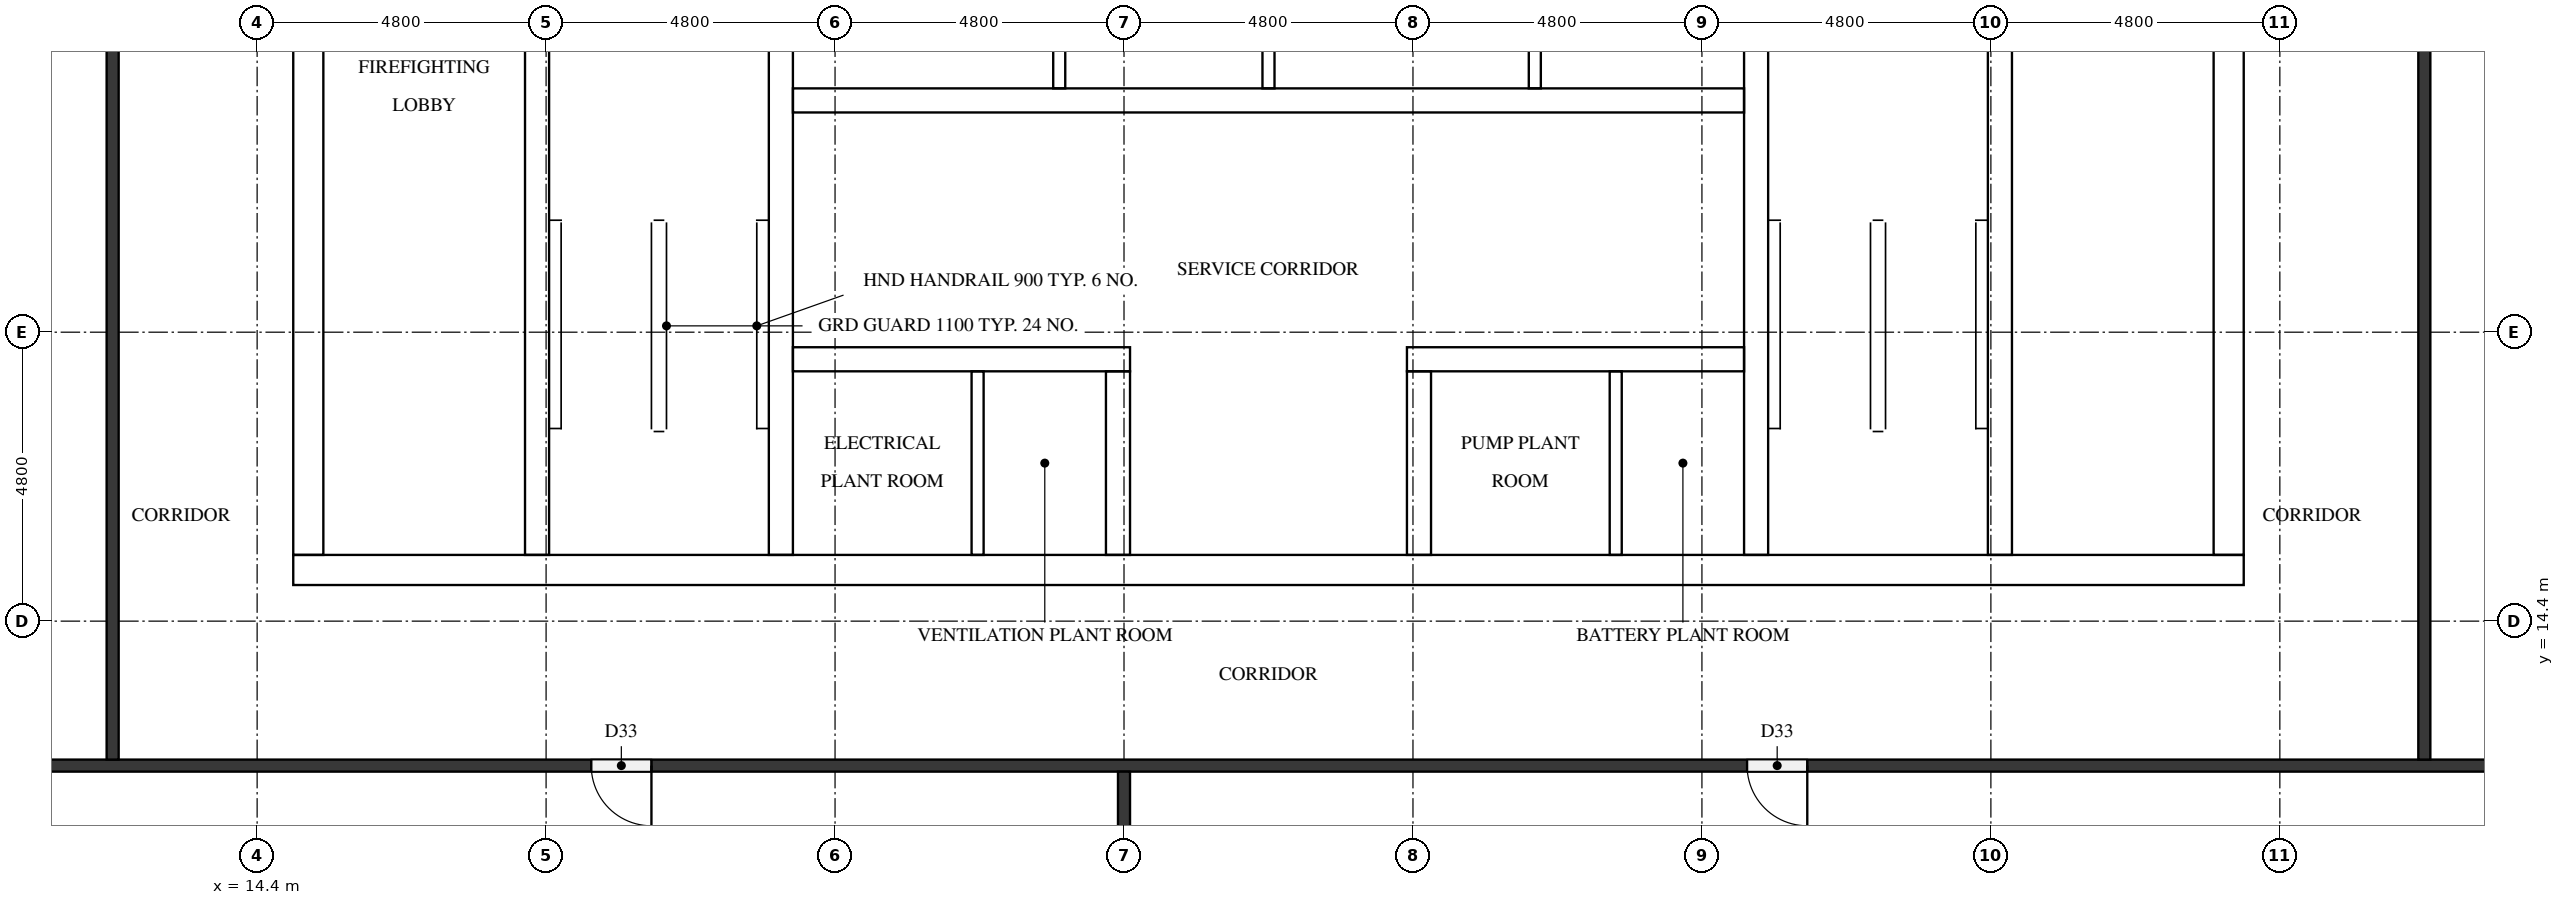
"""IFC4 building model, lengths in metres.
Left out: names, types, materials, properties, quantities, classifications, styles, units other than length and angle.
Written with IfcOpenShell. Run it as: python <this file> out.ifc"""

import sys

from ifc_helpers import new_model, si_unit, direction, frame, frame_2d, origin, place, context, subcontext, project, spatial, rectangle, extrude, element, fill, save


model = new_model("IFC4")
c1 = context("Model", 3, precision=1e-05, world=origin(), true_north=direction((0.0, 1.0)))
c2 = subcontext(c1, "Body", "Model", "MODEL_VIEW")
j1 = project(units=[si_unit("LENGTHUNIT", "METRE"), si_unit("PLANEANGLEUNIT", "RADIAN")], contexts=[c1])
p1 = place(None, origin())
s1 = spatial("IfcSite", under=j1, at=p1, CompositionType="ELEMENT")
p2 = place(p1, origin())
s2 = spatial("IfcBuilding", under=s1, at=p2, CompositionType="ELEMENT")
p3 = place(p2, frame((0.0, 0.0, 310.1)))
s3 = spatial("IfcBuildingStorey", under=s2, at=p3, CompositionType="ELEMENT", Elevation=310.1)
p4 = place(p3, frame((15.0, 15.25, 0.0), z_axis=(0.0, 0.0, 1.0), x_axis=(1.0, 0.0, 0.0)))
e1 = element("IfcWall", 1, at=p4, inside=s3, PredefinedType="SHEAR", context=c2, shape_type="SweptSolid", body=[
    extrude(rectangle(XDim=32.4, YDim=0.5, at=frame_2d((16.2, 0.0))), origin(), (0.0, 0.0, 1.0), 3.8),
])
p5 = place(p4, frame((15.3, 0.0, 0.0)))
e2 = element("IfcOpeningElement", 2, at=p5, cuts=e1, PredefinedType="OPENING", context=c2, shape_type="SweptSolid", body=[
    extrude(rectangle(XDim=1.8, YDim=2.1, at=frame_2d((0.9, 1.05))), frame((0.0, 0.26, 0.0), z_axis=(0.0, -1.0, 0.0), x_axis=(1.0, 0.0, 0.0)), (0.0, 0.0, 1.0), 0.52),
])
p6 = place(p3, frame((15.25, 15.5, 0.0), z_axis=(0.0, 0.0, 1.0), x_axis=(0.0, 1.0, 0.0)))
e3 = element("IfcWall", 3, at=p6, inside=s3, PredefinedType="SHEAR", context=c2, shape_type="SweptSolid", body=[
    extrude(rectangle(XDim=21.8, YDim=0.5, at=frame_2d((10.9, 0.0))), origin(), (0.0, 0.0, 1.0), 3.8),
])
p7 = place(p6, frame((5.26, 0.0, 0.0)))
e4 = element("IfcOpeningElement", 4, at=p7, cuts=e3, PredefinedType="OPENING", context=c2, shape_type="SweptSolid", body=[
    extrude(rectangle(XDim=1.2, YDim=2.1, at=frame_2d((0.6, 1.05))), frame((0.0, 0.26, 0.0), z_axis=(0.0, -1.0, 0.0), x_axis=(1.0, 0.0, 0.0)), (0.0, 0.0, 1.0), 0.52),
])
p8 = place(p3, frame((47.15, 15.5, 0.0), z_axis=(0.0, 0.0, 1.0), x_axis=(0.0, 1.0, 0.0)))
e5 = element("IfcWall", 5, at=p8, inside=s3, PredefinedType="SHEAR", context=c2, shape_type="SweptSolid", body=[
    extrude(rectangle(XDim=21.8, YDim=0.5, at=frame_2d((10.9, 0.0))), origin(), (0.0, 0.0, 1.0), 3.8),
])
p9 = place(p8, frame((10.6, 0.0, 0.0)))
e6 = element("IfcOpeningElement", 6, at=p9, cuts=e5, PredefinedType="OPENING", context=c2, shape_type="SweptSolid", body=[
    extrude(rectangle(XDim=1.2, YDim=2.1, at=frame_2d((0.6, 1.05))), frame((0.0, 0.26, 0.0), z_axis=(0.0, -1.0, 0.0), x_axis=(1.0, 0.0, 0.0)), (0.0, 0.0, 1.0), 0.52),
])
p10 = place(p3, frame((19.05, 15.5, 0.0), z_axis=(0.0, 0.0, 1.0), x_axis=(0.0, 1.0, 0.0)))
e7 = element("IfcWall", 7, at=p10, inside=s3, PredefinedType="SHEAR", context=c2, shape_type="SweptSolid", body=[
    extrude(rectangle(XDim=15.55, YDim=0.4, at=frame_2d((7.775, 0.0))), origin(), (0.0, 0.0, 1.0), 3.8),
])
p11 = place(p10, frame((9.95, 0.0, 0.0)))
e8 = element("IfcOpeningElement", 8, at=p11, cuts=e7, PredefinedType="OPENING", context=c2, shape_type="SweptSolid", body=[
    extrude(rectangle(XDim=1.1, YDim=2.1, at=frame_2d((0.55, 1.05))), frame((0.0, 0.21, 0.0), z_axis=(0.0, -1.0, 0.0), x_axis=(1.0, 0.0, 0.0)), (0.0, 0.0, 1.0), 0.42),
])
p12 = place(p10, frame((13.45, 0.0, 0.0)))
e9 = element("IfcOpeningElement", 9, at=p12, cuts=e7, PredefinedType="OPENING", context=c2, shape_type="SweptSolid", body=[
    extrude(rectangle(XDim=1.1, YDim=2.1, at=frame_2d((0.55, 1.05))), frame((0.0, 0.21, 0.0), z_axis=(0.0, -1.0, 0.0), x_axis=(1.0, 0.0, 0.0)), (0.0, 0.0, 1.0), 0.42),
])
p13 = place(p10, frame((0.7, 0.0, 0.0)))
e10 = element("IfcOpeningElement", 10, at=p13, cuts=e7, PredefinedType="OPENING", context=c2, shape_type="SweptSolid", body=[
    extrude(rectangle(XDim=1.2, YDim=2.1, at=frame_2d((0.6, 1.05))), frame((0.0, 0.21, 0.0), z_axis=(0.0, -1.0, 0.0), x_axis=(1.0, 0.0, 0.0)), (0.0, 0.0, 1.0), 0.42),
])
p14 = place(p3, frame((23.1, 15.5, 0.0), z_axis=(0.0, 0.0, 1.0), x_axis=(0.0, 1.0, 0.0)))
e11 = element("IfcWall", 11, at=p14, inside=s3, PredefinedType="SHEAR", context=c2, shape_type="SweptSolid", body=[
    extrude(rectangle(XDim=21.8, YDim=0.4, at=frame_2d((10.9, 0.0))), origin(), (0.0, 0.0, 1.0), 3.8),
])
p15 = place(p3, frame((39.3, 15.5, 0.0), z_axis=(0.0, 0.0, 1.0), x_axis=(0.0, 1.0, 0.0)))
e12 = element("IfcWall", 12, at=p15, inside=s3, PredefinedType="SHEAR", context=c2, shape_type="SweptSolid", body=[
    extrude(rectangle(XDim=8.75, YDim=0.4, at=frame_2d((4.375, 0.0))), origin(), (0.0, 0.0, 1.0), 3.8),
])
p16 = place(p3, frame((43.35, 15.5, 0.0), z_axis=(0.0, 0.0, 1.0), x_axis=(0.0, 1.0, 0.0)))
e13 = element("IfcWall", 13, at=p16, inside=s3, PredefinedType="SHEAR", context=c2, shape_type="SweptSolid", body=[
    extrude(rectangle(XDim=8.75, YDim=0.4, at=frame_2d((4.375, 0.0))), origin(), (0.0, 0.0, 1.0), 3.8),
])
p17 = place(p16, frame((0.7, 0.0, 0.0)))
e14 = element("IfcOpeningElement", 14, at=p17, cuts=e13, PredefinedType="OPENING", context=c2, shape_type="SweptSolid", body=[
    extrude(rectangle(XDim=1.2, YDim=2.1, at=frame_2d((0.6, 1.05))), frame((0.0, 0.21, 0.0), z_axis=(0.0, -1.0, 0.0), x_axis=(1.0, 0.0, 0.0)), (0.0, 0.0, 1.0), 0.42),
])
p18 = place(p3, frame((23.3, 18.75, 0.0), z_axis=(0.0, 0.0, 1.0), x_axis=(1.0, 0.0, 0.0)))
e15 = element("IfcWall", 15, at=p18, inside=s3, PredefinedType="SHEAR", context=c2, shape_type="SweptSolid", body=[
    extrude(rectangle(XDim=5.6, YDim=0.4, at=frame_2d((2.8, 0.0))), origin(), (0.0, 0.0, 1.0), 3.8),
])
p19 = place(p18, frame((0.984, 0.0, 0.0)))
e16 = element("IfcOpeningElement", 16, at=p19, cuts=e15, PredefinedType="OPENING", context=c2, shape_type="SweptSolid", body=[
    extrude(rectangle(XDim=1.0, YDim=2.1, at=frame_2d((0.5, 1.05))), frame((0.0, 0.21, 0.0), z_axis=(0.0, -1.0, 0.0), x_axis=(1.0, 0.0, 0.0)), (0.0, 0.0, 1.0), 0.42),
])
p20 = place(p18, frame((3.684, 0.0, 0.0)))
e17 = element("IfcOpeningElement", 17, at=p20, cuts=e15, PredefinedType="OPENING", context=c2, shape_type="SweptSolid", body=[
    extrude(rectangle(XDim=1.0, YDim=2.1, at=frame_2d((0.5, 1.05))), frame((0.0, 0.21, 0.0), z_axis=(0.0, -1.0, 0.0), x_axis=(1.0, 0.0, 0.0)), (0.0, 0.0, 1.0), 0.42),
])
p21 = place(p3, frame((33.5, 18.75, 0.0), z_axis=(0.0, 0.0, 1.0), x_axis=(1.0, 0.0, 0.0)))
e18 = element("IfcWall", 18, at=p21, inside=s3, PredefinedType="SHEAR", context=c2, shape_type="SweptSolid", body=[
    extrude(rectangle(XDim=5.6, YDim=0.4, at=frame_2d((2.8, 0.0))), origin(), (0.0, 0.0, 1.0), 3.8),
])
p22 = place(p21, frame((1.384, 0.0, 0.0)))
e19 = element("IfcOpeningElement", 19, at=p22, cuts=e18, PredefinedType="OPENING", context=c2, shape_type="SweptSolid", body=[
    extrude(rectangle(XDim=1.0, YDim=2.1, at=frame_2d((0.5, 1.05))), frame((0.0, 0.21, 0.0), z_axis=(0.0, -1.0, 0.0), x_axis=(1.0, 0.0, 0.0)), (0.0, 0.0, 1.0), 0.42),
])
p23 = place(p21, frame((4.084, 0.0, 0.0)))
e20 = element("IfcOpeningElement", 20, at=p23, cuts=e18, PredefinedType="OPENING", context=c2, shape_type="SweptSolid", body=[
    extrude(rectangle(XDim=1.0, YDim=2.1, at=frame_2d((0.5, 1.05))), frame((0.0, 0.21, 0.0), z_axis=(0.0, -1.0, 0.0), x_axis=(1.0, 0.0, 0.0)), (0.0, 0.0, 1.0), 0.42),
])
p24 = place(p3, frame((23.3, 23.05, 0.0), z_axis=(0.0, 0.0, 1.0), x_axis=(1.0, 0.0, 0.0)))
e21 = element("IfcWall", 21, at=p24, inside=s3, PredefinedType="SHEAR", context=c2, shape_type="SweptSolid", body=[
    extrude(rectangle(XDim=15.8, YDim=0.4, at=frame_2d((7.9, 0.0))), origin(), (0.0, 0.0, 1.0), 3.8),
])
p25 = place(p24, frame((1.662, 0.0, 0.0)))
e22 = element("IfcOpeningElement", 22, at=p25, cuts=e21, PredefinedType="OPENING", context=c2, shape_type="SweptSolid", body=[
    extrude(rectangle(XDim=1.0, YDim=2.1, at=frame_2d((0.5, 1.05))), frame((0.0, 0.21, 0.0), z_axis=(0.0, -1.0, 0.0), x_axis=(1.0, 0.0, 0.0)), (0.0, 0.0, 1.0), 0.42),
])
p26 = place(p24, frame((5.662, 0.0, 0.0)))
e23 = element("IfcOpeningElement", 23, at=p26, cuts=e21, PredefinedType="OPENING", context=c2, shape_type="SweptSolid", body=[
    extrude(rectangle(XDim=1.0, YDim=2.1, at=frame_2d((0.5, 1.05))), frame((0.0, 0.21, 0.0), z_axis=(0.0, -1.0, 0.0), x_axis=(1.0, 0.0, 0.0)), (0.0, 0.0, 1.0), 0.42),
])
p27 = place(p24, frame((9.612, 0.0, 0.0)))
e24 = element("IfcOpeningElement", 24, at=p27, cuts=e21, PredefinedType="OPENING", context=c2, shape_type="SweptSolid", body=[
    extrude(rectangle(XDim=1.0, YDim=2.1, at=frame_2d((0.5, 1.05))), frame((0.0, 0.21, 0.0), z_axis=(0.0, -1.0, 0.0), x_axis=(1.0, 0.0, 0.0)), (0.0, 0.0, 1.0), 0.42),
])
p28 = place(p24, frame((13.612, 0.0, 0.0)))
e25 = element("IfcOpeningElement", 25, at=p28, cuts=e21, PredefinedType="OPENING", context=c2, shape_type="SweptSolid", body=[
    extrude(rectangle(XDim=1.0, YDim=2.1, at=frame_2d((0.5, 1.05))), frame((0.0, 0.21, 0.0), z_axis=(0.0, -1.0, 0.0), x_axis=(1.0, 0.0, 0.0)), (0.0, 0.0, 1.0), 0.42),
])
for number, where, z_axis, x_axis in (
    (26, (28.7, 15.5, 0.0), (0.0, 0.0, 1.0), (0.0, 1.0, 0.0)),
    (27, (33.7, 15.5, 0.0), (0.0, 0.0, 1.0), (0.0, 1.0, 0.0)),
):
    element("IfcWall", number, at=place(p3, frame(where, z_axis=z_axis, x_axis=x_axis)), inside=s3, PredefinedType="SHEAR", context=c2, shape_type="SweptSolid", body=[
        extrude(rectangle(XDim=3.05, YDim=0.4, at=frame_2d((1.525, 0.0))), origin(), (0.0, 0.0, 1.0), 3.8),
    ])
for number, where, z_axis, x_axis in (
    (28, (27.724, 23.25, 0.0), (0.0, 0.0, 1.0), (0.0, 1.0, 0.0)),
    (29, (31.2, 23.25, 0.0), (0.0, 0.0, 1.0), (0.0, 1.0, 0.0)),
    (30, (35.624, 23.25, 0.0), (0.0, 0.0, 1.0), (0.0, 1.0, 0.0)),
):
    element("IfcWall", number, at=place(p3, frame(where, z_axis=z_axis, x_axis=x_axis)), inside=s3, PredefinedType="PARTITIONING", context=c2, shape_type="SweptSolid", body=[
        extrude(rectangle(XDim=2.7, YDim=0.2, at=frame_2d((1.35, 0.0))), origin(), (0.0, 0.0, 1.0), 3.8),
    ])
for number, where, z_axis, x_axis in (
    (31, (26.368, 15.5, 0.0), (0.0, 0.0, 1.0), (0.0, 1.0, 0.0)),
    (32, (36.968, 15.5, 0.0), (0.0, 0.0, 1.0), (0.0, 1.0, 0.0)),
):
    element("IfcWall", number, at=place(p3, frame(where, z_axis=z_axis, x_axis=x_axis)), inside=s3, PredefinedType="PARTITIONING", context=c2, shape_type="SweptSolid", body=[
        extrude(rectangle(XDim=3.05, YDim=0.2, at=frame_2d((1.525, 0.0))), origin(), (0.0, 0.0, 1.0), 3.8),
    ])
p29 = place(p3, frame((56.3, 12.0, 0.0), z_axis=(0.0, 0.0, 1.0), x_axis=(-1.0, 0.0, 0.0)))
e33 = element("IfcWall", 33, at=p29, inside=s3, PredefinedType="PARTITIONING", context=c2, shape_type="SweptSolid", body=[
    extrude(rectangle(XDim=55.0, YDim=0.2, at=frame_2d((27.5, 0.0))), origin(), (0.0, 0.0, 1.0), 3.8),
])
p30 = place(p29, frame((35.35, 0.0, 0.0)))
e34 = element("IfcOpeningElement", 34, at=p30, cuts=e33, PredefinedType="OPENING", context=c2, shape_type="SweptSolid", body=[
    extrude(rectangle(XDim=1.0, YDim=2.1, at=frame_2d((0.5, 1.05))), frame((0.0, 0.11, 0.0), z_axis=(0.0, -1.0, 0.0), x_axis=(1.0, 0.0, 0.0)), (0.0, 0.0, 1.0), 0.22),
])
p31 = place(p29, frame((16.15, 0.0, 0.0)))
e35 = element("IfcOpeningElement", 35, at=p31, cuts=e33, PredefinedType="OPENING", context=c2, shape_type="SweptSolid", body=[
    extrude(rectangle(XDim=1.0, YDim=2.1, at=frame_2d((0.5, 1.05))), frame((0.0, 0.11, 0.0), z_axis=(0.0, -1.0, 0.0), x_axis=(1.0, 0.0, 0.0)), (0.0, 0.0, 1.0), 0.22),
])
p32 = place(p3, frame((12.0, 12.1, 0.0), z_axis=(0.0, 0.0, 1.0), x_axis=(0.0, 1.0, 0.0)))
e36 = element("IfcWall", 36, at=p32, inside=s3, PredefinedType="PARTITIONING", context=c2, shape_type="SweptSolid", body=[
    extrude(rectangle(XDim=28.6, YDim=0.2, at=frame_2d((14.3, 0.0))), origin(), (0.0, 0.0, 1.0), 3.8),
])
p33 = place(p32, frame((13.75, 0.0, 0.0)))
e37 = element("IfcOpeningElement", 37, at=p33, cuts=e36, PredefinedType="OPENING", context=c2, shape_type="SweptSolid", body=[
    extrude(rectangle(XDim=1.0, YDim=2.1, at=frame_2d((0.5, 1.05))), frame((0.0, 0.11, 0.0), z_axis=(0.0, -1.0, 0.0), x_axis=(1.0, 0.0, 0.0)), (0.0, 0.0, 1.0), 0.22),
])
p34 = place(p3, frame((28.8, 1.3, 0.0), z_axis=(0.0, 0.0, 1.0), x_axis=(0.0, 1.0, 0.0)))
e38 = element("IfcWall", 38, at=p34, inside=s3, PredefinedType="PARTITIONING", context=c2, shape_type="SweptSolid", body=[
    extrude(rectangle(XDim=10.6, YDim=0.2, at=frame_2d((5.3, 0.0))), origin(), (0.0, 0.0, 1.0), 3.8),
])
p35 = place(p3, frame((50.4, 40.7, 0.0), z_axis=(0.0, 0.0, 1.0), x_axis=(0.0, -1.0, 0.0)))
e39 = element("IfcWall", 39, at=p35, inside=s3, PredefinedType="PARTITIONING", context=c2, shape_type="SweptSolid", body=[
    extrude(rectangle(XDim=28.6, YDim=0.2, at=frame_2d((14.3, 0.0))), origin(), (0.0, 0.0, 1.0), 3.8),
])
p36 = place(p35, frame((13.75, 0.0, 0.0)))
e40 = element("IfcOpeningElement", 40, at=p36, cuts=e39, PredefinedType="OPENING", context=c2, shape_type="SweptSolid", body=[
    extrude(rectangle(XDim=1.0, YDim=2.1, at=frame_2d((0.5, 1.05))), frame((0.0, 0.11, 0.0), z_axis=(0.0, -1.0, 0.0), x_axis=(1.0, 0.0, 0.0)), (0.0, 0.0, 1.0), 0.22),
])
p37 = place(p13, frame((1.2, 0.0, 0.0), z_axis=(0.0, 0.0, 1.0), x_axis=(-1.0, 0.0, 0.0)))
e41 = element("IfcDoor", 41, at=p37, inside=s3, OperationType="SINGLE_SWING_RIGHT", PredefinedType="DOOR", context=c2, shape_type="SweptSolid", body=[
    extrude(rectangle(XDim=1.2, YDim=2.1, at=frame_2d((0.6, 1.05))), frame((0.0, 0.025, 0.0), z_axis=(0.0, -1.0, 0.0), x_axis=(1.0, 0.0, 0.0)), (0.0, 0.0, 1.0), 0.05),
])
fill(e10, e41)
p38 = place(p17, origin())
e42 = element("IfcDoor", 42, at=p38, inside=s3, OperationType="SINGLE_SWING_LEFT", PredefinedType="DOOR", context=c2, shape_type="SweptSolid", body=[
    extrude(rectangle(XDim=1.2, YDim=2.1, at=frame_2d((0.6, 1.05))), frame((0.0, 0.025, 0.0), z_axis=(0.0, -1.0, 0.0), x_axis=(1.0, 0.0, 0.0)), (0.0, 0.0, 1.0), 0.05),
])
fill(e14, e42)
p39 = place(p5, frame((1.8, 0.0, 0.0), z_axis=(0.0, 0.0, 1.0), x_axis=(-1.0, 0.0, 0.0)))
e43 = element("IfcDoor", 43, at=p39, inside=s3, OperationType="DOUBLE_DOOR_SINGLE_SWING", PredefinedType="DOOR", context=c2, shape_type="SweptSolid", body=[
    extrude(rectangle(XDim=1.8, YDim=2.1, at=frame_2d((0.9, 1.05))), frame((0.0, 0.025, 0.0), z_axis=(0.0, -1.0, 0.0), x_axis=(1.0, 0.0, 0.0)), (0.0, 0.0, 1.0), 0.05),
])
fill(e2, e43)
p40 = place(p7, frame((1.2, 0.0, 0.0), z_axis=(0.0, 0.0, 1.0), x_axis=(-1.0, 0.0, 0.0)))
e44 = element("IfcDoor", 44, at=p40, inside=s3, OperationType="SINGLE_SWING_LEFT", PredefinedType="DOOR", context=c2, shape_type="SweptSolid", body=[
    extrude(rectangle(XDim=1.2, YDim=2.1, at=frame_2d((0.6, 1.05))), frame((0.0, 0.025, 0.0), z_axis=(0.0, -1.0, 0.0), x_axis=(1.0, 0.0, 0.0)), (0.0, 0.0, 1.0), 0.05),
])
fill(e4, e44)
p41 = place(p25, frame((1.0, 0.0, 0.0), z_axis=(0.0, 0.0, 1.0), x_axis=(-1.0, 0.0, 0.0)))
e45 = element("IfcDoor", 45, at=p41, inside=s3, OperationType="SINGLE_SWING_LEFT", PredefinedType="DOOR", context=c2, shape_type="SweptSolid", body=[
    extrude(rectangle(XDim=1.0, YDim=2.1, at=frame_2d((0.5, 1.05))), frame((0.0, 0.025, 0.0), z_axis=(0.0, -1.0, 0.0), x_axis=(1.0, 0.0, 0.0)), (0.0, 0.0, 1.0), 0.05),
])
fill(e22, e45)
p42 = place(p26, frame((1.0, 0.0, 0.0), z_axis=(0.0, 0.0, 1.0), x_axis=(-1.0, 0.0, 0.0)))
e46 = element("IfcDoor", 46, at=p42, inside=s3, OperationType="SINGLE_SWING_RIGHT", PredefinedType="DOOR", context=c2, shape_type="SweptSolid", body=[
    extrude(rectangle(XDim=1.0, YDim=2.1, at=frame_2d((0.5, 1.05))), frame((0.0, 0.025, 0.0), z_axis=(0.0, -1.0, 0.0), x_axis=(1.0, 0.0, 0.0)), (0.0, 0.0, 1.0), 0.05),
])
fill(e23, e46)
p43 = place(p27, frame((1.0, 0.0, 0.0), z_axis=(0.0, 0.0, 1.0), x_axis=(-1.0, 0.0, 0.0)))
e47 = element("IfcDoor", 47, at=p43, inside=s3, OperationType="SINGLE_SWING_LEFT", PredefinedType="DOOR", context=c2, shape_type="SweptSolid", body=[
    extrude(rectangle(XDim=1.0, YDim=2.1, at=frame_2d((0.5, 1.05))), frame((0.0, 0.025, 0.0), z_axis=(0.0, -1.0, 0.0), x_axis=(1.0, 0.0, 0.0)), (0.0, 0.0, 1.0), 0.05),
])
fill(e24, e47)
p44 = place(p28, frame((1.0, 0.0, 0.0), z_axis=(0.0, 0.0, 1.0), x_axis=(-1.0, 0.0, 0.0)))
e48 = element("IfcDoor", 48, at=p44, inside=s3, OperationType="SINGLE_SWING_RIGHT", PredefinedType="DOOR", context=c2, shape_type="SweptSolid", body=[
    extrude(rectangle(XDim=1.0, YDim=2.1, at=frame_2d((0.5, 1.05))), frame((0.0, 0.025, 0.0), z_axis=(0.0, -1.0, 0.0), x_axis=(1.0, 0.0, 0.0)), (0.0, 0.0, 1.0), 0.05),
])
fill(e25, e48)
p45 = place(p19, origin())
e49 = element("IfcDoor", 49, at=p45, inside=s3, OperationType="SINGLE_SWING_LEFT", PredefinedType="DOOR", context=c2, shape_type="SweptSolid", body=[
    extrude(rectangle(XDim=1.0, YDim=2.1, at=frame_2d((0.5, 1.05))), frame((0.0, 0.025, 0.0), z_axis=(0.0, -1.0, 0.0), x_axis=(1.0, 0.0, 0.0)), (0.0, 0.0, 1.0), 0.05),
])
fill(e16, e49)
p46 = place(p20, origin())
e50 = element("IfcDoor", 50, at=p46, inside=s3, OperationType="SINGLE_SWING_RIGHT", PredefinedType="DOOR", context=c2, shape_type="SweptSolid", body=[
    extrude(rectangle(XDim=1.0, YDim=2.1, at=frame_2d((0.5, 1.05))), frame((0.0, 0.025, 0.0), z_axis=(0.0, -1.0, 0.0), x_axis=(1.0, 0.0, 0.0)), (0.0, 0.0, 1.0), 0.05),
])
fill(e17, e50)
p47 = place(p22, origin())
e51 = element("IfcDoor", 51, at=p47, inside=s3, OperationType="SINGLE_SWING_LEFT", PredefinedType="DOOR", context=c2, shape_type="SweptSolid", body=[
    extrude(rectangle(XDim=1.0, YDim=2.1, at=frame_2d((0.5, 1.05))), frame((0.0, 0.025, 0.0), z_axis=(0.0, -1.0, 0.0), x_axis=(1.0, 0.0, 0.0)), (0.0, 0.0, 1.0), 0.05),
])
fill(e19, e51)
p48 = place(p23, origin())
e52 = element("IfcDoor", 52, at=p48, inside=s3, OperationType="SINGLE_SWING_RIGHT", PredefinedType="DOOR", context=c2, shape_type="SweptSolid", body=[
    extrude(rectangle(XDim=1.0, YDim=2.1, at=frame_2d((0.5, 1.05))), frame((0.0, 0.025, 0.0), z_axis=(0.0, -1.0, 0.0), x_axis=(1.0, 0.0, 0.0)), (0.0, 0.0, 1.0), 0.05),
])
fill(e20, e52)
p49 = place(p30, origin())
e53 = element("IfcDoor", 53, at=p49, inside=s3, OperationType="SINGLE_SWING_LEFT", PredefinedType="DOOR", context=c2, shape_type="SweptSolid", body=[
    extrude(rectangle(XDim=1.0, YDim=2.1, at=frame_2d((0.5, 1.05))), frame((0.0, 0.025, 0.0), z_axis=(0.0, -1.0, 0.0), x_axis=(1.0, 0.0, 0.0)), (0.0, 0.0, 1.0), 0.05),
])
fill(e34, e53)
p50 = place(p31, origin())
e54 = element("IfcDoor", 54, at=p50, inside=s3, OperationType="SINGLE_SWING_LEFT", PredefinedType="DOOR", context=c2, shape_type="SweptSolid", body=[
    extrude(rectangle(XDim=1.0, YDim=2.1, at=frame_2d((0.5, 1.05))), frame((0.0, 0.025, 0.0), z_axis=(0.0, -1.0, 0.0), x_axis=(1.0, 0.0, 0.0)), (0.0, 0.0, 1.0), 0.05),
])
fill(e35, e54)
save(model, sys.argv[1])
